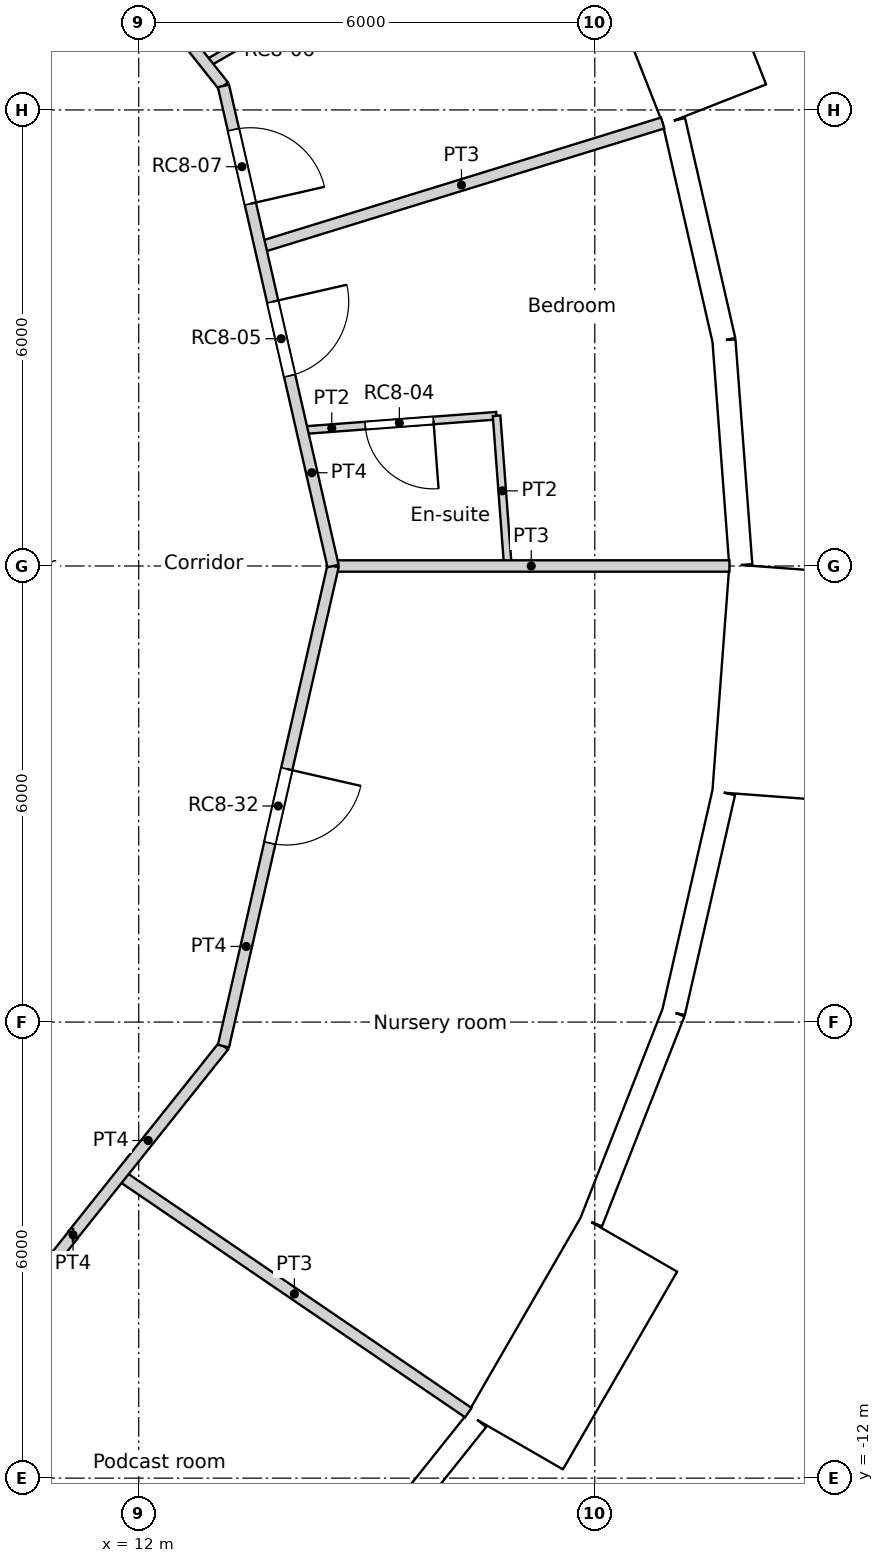
"""IFC4 building model, lengths in metres.
Left out: names, types, materials, properties, quantities, classifications, styles, units other than length and angle.
Written with IfcOpenShell. Run it as: python <this file> out.ifc"""

import sys

from ifc_helpers import new_model, si_unit, direction, frame, frame_2d, origin, origin_2d, place, context, subcontext, project, spatial, rectangle, circle, extrude, element, fill, save


model = new_model("IFC4")
c1 = context("Model", 3, precision=1e-05, world=origin(), true_north=direction((0.0, 1.0)))
c2 = subcontext(c1, "Body", "Model", "MODEL_VIEW")
j1 = project(units=[si_unit("LENGTHUNIT", "METRE"), si_unit("PLANEANGLEUNIT", "RADIAN")], contexts=[c1])
p1 = place(None, origin())
s1 = spatial("IfcSite", under=j1, at=p1, CompositionType="ELEMENT")
p2 = place(p1, origin())
s2 = spatial("IfcBuilding", under=s1, at=p2, CompositionType="ELEMENT")
p3 = place(p2, frame((0.0, 0.0, 305.4)))
s3 = spatial("IfcBuildingStorey", under=s2, at=p3, CompositionType="ELEMENT", Elevation=305.4)
for number, where, z_axis, x_axis in (
    (1, (18.822, 0.0, 0.0), (0.0, 0.0, 1.0), (1.0, 0.0, 0.0)),
    (2, (17.986, 5.548, 0.0), (0.0, 0.0, 1.0), (1.0, 0.0, 0.0)),
    (3, (15.552, -10.603, 0.0), (0.0, 0.0, 1.0), (1.0, 0.0, 0.0)),
    (4, (17.986, -5.548, 0.0), (0.0, 0.0, 1.0), (1.0, 0.0, 0.0)),
):
    element("IfcColumn", number, at=place(p3, frame(where, z_axis=z_axis, x_axis=x_axis)), inside=s3, PredefinedType="COLUMN", context=c2, shape_type="SweptSolid", body=[
        extrude(circle(Radius=0.45, at=origin_2d()), origin(), (0.0, 0.0, 1.0), 3.6),
    ])
p4 = place(p3, frame((19.921, 0.015, 0.0), z_axis=(0.0, 0.0, 1.0), x_axis=(-0.07474897196, 0.997202382263, 0.0)))
e5 = element("IfcWall", 5, at=p4, inside=s3, PredefinedType="SOLIDWALL", context=c2, shape_type="SweptSolid", body=[
    extrude(rectangle(XDim=2.962, YDim=0.3, at=frame_2d((1.481, 0.0))), origin(), (0.0, 0.0, 1.0), 2.8),
])
p5 = place(p4, frame((1.481, 0.0, 1.55)))
e6 = element("IfcOpeningElement", 6, at=p5, cuts=e5, PredefinedType="OPENING", context=c2, shape_type="SweptSolid", body=[
    extrude(circle(Radius=0.9, at=origin_2d()), frame((0.0, 0.16, 0.0), z_axis=(0.0, -1.0, 0.0), x_axis=(1.0, 0.0, 0.0)), (0.0, 0.0, 1.0), 0.32),
])
p6 = place(p3, frame((19.699, 2.969, 0.0), z_axis=(0.0, 0.0, 1.0), x_axis=(-0.222529389789, 0.974925982155, 0.0)))
e7 = element("IfcWall", 7, at=p6, inside=s3, PredefinedType="SOLIDWALL", context=c2, shape_type="SweptSolid", body=[
    extrude(rectangle(XDim=2.962, YDim=0.3, at=frame_2d((1.481, 0.0))), origin(), (0.0, 0.0, 1.0), 3.25),
])
p7 = place(p6, frame((1.481, 0.0, 1.55)))
e8 = element("IfcOpeningElement", 8, at=p7, cuts=e7, PredefinedType="OPENING", context=c2, shape_type="SweptSolid", body=[
    extrude(circle(Radius=0.9, at=origin_2d()), frame((0.0, 0.16, 0.0), z_axis=(0.0, -1.0, 0.0), x_axis=(1.0, 0.0, 0.0)), (0.0, 0.0, 1.0), 0.32),
])
p8 = place(p3, frame((19.576, 6.072, -0.35), z_axis=(0.0, 0.0, 1.0), x_axis=(-0.36537792632, 0.93085926485, 0.0)))
e9 = element("IfcWall", 9, at=p8, inside=s3, PredefinedType="ELEMENTEDWALL", context=c2, shape_type="SweptSolid", body=[
    extrude(rectangle(XDim=3.0, YDim=1.45, at=frame_2d((1.5, 0.0))), origin(), (0.0, 0.0, 1.0), 3.6),
])
p9 = place(p8, frame((1.5, 0.0, 1.9)))
e10 = element("IfcOpeningElement", 10, at=p9, cuts=e9, PredefinedType="OPENING", context=c2, shape_type="SweptSolid", body=[
    extrude(circle(Radius=0.9, at=origin_2d()), frame((0.0, 0.735, 0.0), z_axis=(0.0, -1.0, 0.0), x_axis=(1.0, 0.0, 0.0)), (0.0, 0.0, 1.0), 1.47),
])
p10 = place(p3, frame((14.604, -13.55, 0.0), z_axis=(0.0, 0.0, 1.0), x_axis=(0.623498236992, 0.781824755599, 0.0)))
e11 = element("IfcWall", 11, at=p10, inside=s3, PredefinedType="SOLIDWALL", context=c2, shape_type="SweptSolid", body=[
    extrude(rectangle(XDim=2.962, YDim=0.3, at=frame_2d((1.481, 0.0))), origin(), (0.0, 0.0, 1.0), 3.25),
])
p11 = place(p10, frame((1.481, 0.0, 1.55)))
e12 = element("IfcOpeningElement", 12, at=p11, cuts=e11, PredefinedType="OPENING", context=c2, shape_type="SweptSolid", body=[
    extrude(circle(Radius=0.9, at=origin_2d()), frame((0.0, 0.16, 0.0), z_axis=(0.0, -1.0, 0.0), x_axis=(1.0, 0.0, 0.0)), (0.0, 0.0, 1.0), 0.32),
])
p12 = place(p3, frame((16.952, -11.52, -0.35), z_axis=(0.0, 0.0, 1.0), x_axis=(0.499990139034, 0.866031096941, 0.0)))
e13 = element("IfcWall", 13, at=p12, inside=s3, PredefinedType="ELEMENTEDWALL", context=c2, shape_type="SweptSolid", body=[
    extrude(rectangle(XDim=3.0, YDim=1.45, at=frame_2d((1.5, 0.0))), origin(), (0.0, 0.0, 1.0), 3.6),
])
p13 = place(p12, frame((1.5, 0.0, 1.9)))
e14 = element("IfcOpeningElement", 14, at=p13, cuts=e13, PredefinedType="OPENING", context=c2, shape_type="SweptSolid", body=[
    extrude(circle(Radius=0.9, at=origin_2d()), frame((0.0, 0.735, 0.0), z_axis=(0.0, -1.0, 0.0), x_axis=(1.0, 0.0, 0.0)), (0.0, 0.0, 1.0), 1.47),
])
p14 = place(p3, frame((17.955, -8.629, 0.0), z_axis=(0.0, 0.0, 1.0), x_axis=(0.36530043032, 0.930889679612, 0.0)))
e15 = element("IfcWall", 15, at=p14, inside=s3, PredefinedType="SOLIDWALL", context=c2, shape_type="SweptSolid", body=[
    extrude(rectangle(XDim=2.962, YDim=0.3, at=frame_2d((1.481, 0.0))), origin(), (0.0, 0.0, 1.0), 2.8),
])
p15 = place(p14, frame((1.481, 0.0, 1.55)))
e16 = element("IfcOpeningElement", 16, at=p15, cuts=e15, PredefinedType="OPENING", context=c2, shape_type="SweptSolid", body=[
    extrude(circle(Radius=0.9, at=origin_2d()), frame((0.0, 0.16, 0.0), z_axis=(0.0, -1.0, 0.0), x_axis=(1.0, 0.0, 0.0)), (0.0, 0.0, 1.0), 0.32),
])
p16 = place(p3, frame((19.037, -5.872, 0.0), z_axis=(0.0, 0.0, 1.0), x_axis=(0.222529389789, 0.974925982155, 0.0)))
e17 = element("IfcWall", 17, at=p16, inside=s3, PredefinedType="SOLIDWALL", context=c2, shape_type="SweptSolid", body=[
    extrude(rectangle(XDim=2.962, YDim=0.3, at=frame_2d((1.481, 0.0))), origin(), (0.0, 0.0, 1.0), 3.25),
])
p17 = place(p16, frame((1.481, 0.0, 1.55)))
e18 = element("IfcOpeningElement", 18, at=p17, cuts=e17, PredefinedType="OPENING", context=c2, shape_type="SweptSolid", body=[
    extrude(circle(Radius=0.9, at=origin_2d()), frame((0.0, 0.16, 0.0), z_axis=(0.0, -1.0, 0.0), x_axis=(1.0, 0.0, 0.0)), (0.0, 0.0, 1.0), 0.32),
])
p18 = place(p3, frame((20.272, -3.023, -0.35), z_axis=(0.0, 0.0, 1.0), x_axis=(0.074785902127, 0.997199613339, 0.0)))
e19 = element("IfcWall", 19, at=p18, inside=s3, PredefinedType="ELEMENTEDWALL", context=c2, shape_type="SweptSolid", body=[
    extrude(rectangle(XDim=3.0, YDim=1.45, at=frame_2d((1.5, 0.0))), origin(), (0.0, 0.0, 1.0), 3.6),
])
p19 = place(p18, frame((1.5, 0.0, 1.9)))
e20 = element("IfcOpeningElement", 20, at=p19, cuts=e19, PredefinedType="OPENING", context=c2, shape_type="SweptSolid", body=[
    extrude(circle(Radius=0.9, at=origin_2d()), frame((0.0, 0.735, 0.0), z_axis=(0.0, -1.0, 0.0), x_axis=(1.0, 0.0, 0.0)), (0.0, 0.0, 1.0), 1.47),
])
p20 = place(p3, frame((11.137, -8.8, 0.0), z_axis=(0.0, 0.0, 1.0), x_axis=(-1.0, 0.0, 0.0)))
e21 = element("IfcWall", 21, at=p20, inside=s3, PredefinedType="PARTITIONING", context=c2, shape_type="SweptSolid", body=[
    extrude(rectangle(XDim=0.003, YDim=0.15, at=frame_2d((0.001, 0.0))), origin(), (0.0, 0.0, 1.0), 3.25),
])
p21 = place(p3, frame((10.101, -10.101, 0.0), z_axis=(0.0, 0.0, 1.0), x_axis=(0.623098344652, 0.782143498913, 0.0)))
e22 = element("IfcWall", 22, at=p21, inside=s3, PredefinedType="PARTITIONING", context=c2, shape_type="SweptSolid", body=[
    extrude(rectangle(XDim=1.661, YDim=0.15, at=frame_2d((0.831, 0.0))), origin(), (0.0, 0.0, 1.0), 3.25),
])
p22 = place(p3, frame((13.115, 6.316, 0.0), z_axis=(0.0, 0.0, 1.0), x_axis=(0.222568978642, -0.97491694505, 0.0)))
e23 = element("IfcWall", 23, at=p22, inside=s3, PredefinedType="PARTITIONING", context=c2, shape_type="SweptSolid", body=[
    extrude(rectangle(XDim=6.479, YDim=0.15, at=frame_2d((3.239, 0.0))), origin(), (0.0, 0.0, 1.0), 3.25),
])
p23 = place(p22, frame((2.911, 0.0, 0.0)))
e24 = element("IfcOpeningElement", 24, at=p23, cuts=e23, PredefinedType="OPENING", context=c2, shape_type="SweptSolid", body=[
    extrude(rectangle(XDim=1.0, YDim=2.1, at=frame_2d((0.5, 1.05))), frame((0.0, 0.075, 0.0), z_axis=(0.0, -1.0, 0.0), x_axis=(1.0, 0.0, 0.0)), (0.0, 0.0, 1.0), 0.15),
])
p24 = place(p22, frame((0.59, 0.0, 0.0)))
e25 = element("IfcOpeningElement", 25, at=p24, cuts=e23, PredefinedType="OPENING", context=c2, shape_type="SweptSolid", body=[
    extrude(rectangle(XDim=1.0, YDim=2.1, at=frame_2d((0.5, 1.05))), frame((0.0, 0.075, 0.0), z_axis=(0.0, -1.0, 0.0), x_axis=(1.0, 0.0, 0.0)), (0.0, 0.0, 1.0), 0.15),
])
p25 = place(p3, frame((11.76, 8.022, 0.0), z_axis=(0.0, 0.0, 1.0), x_axis=(0.62206805366, -0.782963177049, 0.0)))
e26 = element("IfcWall", 26, at=p25, inside=s3, PredefinedType="PARTITIONING", context=c2, shape_type="SweptSolid", body=[
    extrude(rectangle(XDim=2.179, YDim=0.15, at=frame_2d((1.089, 0.0))), origin(), (0.0, 0.0, 1.0), 3.25),
])
p26 = place(p3, frame((11.134, -8.8, 0.0), z_axis=(0.0, 0.0, 1.0), x_axis=(0.623560523309, 0.781775078761, 0.0)))
e27 = element("IfcWall", 27, at=p26, inside=s3, PredefinedType="PARTITIONING", context=c2, shape_type="SweptSolid", body=[
    extrude(rectangle(XDim=3.177, YDim=0.15, at=frame_2d((1.589, 0.0))), origin(), (0.0, 0.0, 1.0), 3.25),
])
p27 = place(p3, frame((13.115, -6.316, 0.0), z_axis=(0.0, 0.0, 1.0), x_axis=(0.222568978642, 0.97491694505, 0.0)))
e28 = element("IfcWall", 28, at=p27, inside=s3, PredefinedType="PARTITIONING", context=c2, shape_type="SweptSolid", body=[
    extrude(rectangle(XDim=6.479, YDim=0.15, at=frame_2d((3.239, 0.0))), origin(), (0.0, 0.0, 1.0), 3.25),
])
p28 = place(p27, frame((2.74, 0.0, 0.0)))
e29 = element("IfcOpeningElement", 29, at=p28, cuts=e28, PredefinedType="OPENING", context=c2, shape_type="SweptSolid", body=[
    extrude(rectangle(XDim=1.0, YDim=2.04, at=frame_2d((0.5, 1.02))), frame((0.0, 0.075, 0.0), z_axis=(0.0, -1.0, 0.0), x_axis=(1.0, 0.0, 0.0)), (0.0, 0.0, 1.0), 0.15),
])
p29 = place(p3, frame((16.708, 1.977, 0.0), z_axis=(0.0, 0.0, 1.0), x_axis=(0.074624634103, -0.997211694669, 0.0)))
e30 = element("IfcWall", 30, at=p29, inside=s3, PredefinedType="PARTITIONING", context=c2, shape_type="SweptSolid", body=[
    extrude(rectangle(XDim=1.983, YDim=0.1, at=frame_2d((0.991, 0.0))), origin(), (0.0, 0.0, 1.0), 3.25),
])
p30 = place(p3, frame((14.149, 1.785, 0.0), z_axis=(0.0, 0.0, 1.0), x_axis=(0.997193275785, 0.074870359477, 0.0)))
e31 = element("IfcWall", 31, at=p30, inside=s3, PredefinedType="PARTITIONING", context=c2, shape_type="SweptSolid", body=[
    extrude(rectangle(XDim=2.566, YDim=0.1, at=frame_2d((1.283, 0.0))), origin(), (0.0, 0.0, 1.0), 3.25),
])
p31 = place(p30, frame((0.833, 0.0, 0.0)))
e32 = element("IfcOpeningElement", 32, at=p31, cuts=e31, PredefinedType="OPENING", context=c2, shape_type="SweptSolid", body=[
    extrude(rectangle(XDim=0.9, YDim=2.04, at=frame_2d((0.45, 1.02))), frame((0.0, 0.05, 0.0), z_axis=(0.0, -1.0, 0.0), x_axis=(1.0, 0.0, 0.0)), (0.0, 0.0, 1.0), 0.1),
])
p32 = place(p3, frame((13.599, 4.195, 0.0), z_axis=(0.0, 0.0, 1.0), x_axis=(0.955580602693, 0.294729896274, 0.0)))
e33 = element("IfcWall", 33, at=p32, inside=s3, PredefinedType="PARTITIONING", context=c2, shape_type="SweptSolid", body=[
    extrude(rectangle(XDim=5.54, YDim=0.15, at=frame_2d((2.77, 0.0))), origin(), (0.0, 0.0, 1.0), 3.25),
])
p33 = place(p3, frame((14.557, 0.0, 0.0), z_axis=(0.0, 0.0, 1.0), x_axis=(1.0, 0.0, 0.0)))
e34 = element("IfcWall", 34, at=p33, inside=s3, PredefinedType="PARTITIONING", context=c2, shape_type="SweptSolid", body=[
    extrude(rectangle(XDim=5.214, YDim=0.15, at=frame_2d((2.607, 0.0))), origin(), (0.0, 0.0, 1.0), 3.25),
])
p34 = place(p3, frame((12.885, 6.605, 0.0), z_axis=(0.0, 0.0, 1.0), x_axis=(0.866076416361, 0.499911633214, 0.0)))
e35 = element("IfcWall", 35, at=p34, inside=s3, PredefinedType="PARTITIONING", context=c2, shape_type="SweptSolid", body=[
    extrude(rectangle(XDim=2.234, YDim=0.1, at=frame_2d((1.117, 0.0))), origin(), (0.0, 0.0, 1.0), 3.25),
])
p35 = place(p34, frame((0.667, 0.0, 0.0)))
e36 = element("IfcOpeningElement", 36, at=p35, cuts=e35, PredefinedType="OPENING", context=c2, shape_type="SweptSolid", body=[
    extrude(rectangle(XDim=0.9, YDim=2.04, at=frame_2d((0.45, 1.02))), frame((0.0, 0.05, 0.0), z_axis=(0.0, -1.0, 0.0), x_axis=(1.0, 0.0, 0.0)), (0.0, 0.0, 1.0), 0.1),
])
p36 = place(p3, frame((11.759, -8.017, 0.0), z_axis=(0.0, 0.0, 1.0), x_axis=(0.826207761897, -0.563365542238, 0.0)))
e37 = element("IfcWall", 37, at=p36, inside=s3, PredefinedType="PARTITIONING", context=c2, shape_type="SweptSolid", body=[
    extrude(rectangle(XDim=5.54, YDim=0.15, at=frame_2d((2.77, 0.0))), origin(), (0.0, 0.0, 1.0), 3.25),
])
p37 = place(p5, origin())
e38 = element("IfcWindow", 38, at=p37, inside=s3, PartitioningType="SINGLE_PANEL", PredefinedType="WINDOW", context=c2, shape_type="SweptSolid", body=[
    extrude(circle(Radius=0.9, at=origin_2d()), frame((0.0, 0.12, 0.0), z_axis=(0.0, -1.0, 0.0), x_axis=(1.0, 0.0, 0.0)), (0.0, 0.0, 1.0), 0.1),
])
fill(e6, e38)
p38 = place(p7, origin())
e39 = element("IfcWindow", 39, at=p38, inside=s3, PartitioningType="SINGLE_PANEL", PredefinedType="WINDOW", context=c2, shape_type="SweptSolid", body=[
    extrude(circle(Radius=0.9, at=origin_2d()), frame((0.0, 0.12, 0.0), z_axis=(0.0, -1.0, 0.0), x_axis=(1.0, 0.0, 0.0)), (0.0, 0.0, 1.0), 0.1),
])
fill(e8, e39)
p39 = place(p9, origin())
e40 = element("IfcWindow", 40, at=p39, inside=s3, PartitioningType="SINGLE_PANEL", PredefinedType="WINDOW", context=c2, shape_type="SweptSolid", body=[
    extrude(circle(Radius=0.9, at=origin_2d()), frame((0.0, 0.695, 0.0), z_axis=(0.0, -1.0, 0.0), x_axis=(1.0, 0.0, 0.0)), (0.0, 0.0, 1.0), 0.1),
])
fill(e10, e40)
p40 = place(p11, origin())
e41 = element("IfcWindow", 41, at=p40, inside=s3, PartitioningType="SINGLE_PANEL", PredefinedType="WINDOW", context=c2, shape_type="SweptSolid", body=[
    extrude(circle(Radius=0.9, at=origin_2d()), frame((0.0, 0.12, 0.0), z_axis=(0.0, -1.0, 0.0), x_axis=(1.0, 0.0, 0.0)), (0.0, 0.0, 1.0), 0.1),
])
fill(e12, e41)
p41 = place(p13, origin())
e42 = element("IfcWindow", 42, at=p41, inside=s3, PartitioningType="SINGLE_PANEL", PredefinedType="WINDOW", context=c2, shape_type="SweptSolid", body=[
    extrude(circle(Radius=0.9, at=origin_2d()), frame((0.0, 0.695, 0.0), z_axis=(0.0, -1.0, 0.0), x_axis=(1.0, 0.0, 0.0)), (0.0, 0.0, 1.0), 0.1),
])
fill(e14, e42)
p42 = place(p15, origin())
e43 = element("IfcWindow", 43, at=p42, inside=s3, PartitioningType="SINGLE_PANEL", PredefinedType="WINDOW", context=c2, shape_type="SweptSolid", body=[
    extrude(circle(Radius=0.9, at=origin_2d()), frame((0.0, 0.12, 0.0), z_axis=(0.0, -1.0, 0.0), x_axis=(1.0, 0.0, 0.0)), (0.0, 0.0, 1.0), 0.1),
])
fill(e16, e43)
p43 = place(p17, origin())
e44 = element("IfcWindow", 44, at=p43, inside=s3, PartitioningType="SINGLE_PANEL", PredefinedType="WINDOW", context=c2, shape_type="SweptSolid", body=[
    extrude(circle(Radius=0.9, at=origin_2d()), frame((0.0, 0.12, 0.0), z_axis=(0.0, -1.0, 0.0), x_axis=(1.0, 0.0, 0.0)), (0.0, 0.0, 1.0), 0.1),
])
fill(e18, e44)
p44 = place(p19, origin())
e45 = element("IfcWindow", 45, at=p44, inside=s3, PartitioningType="SINGLE_PANEL", PredefinedType="WINDOW", context=c2, shape_type="SweptSolid", body=[
    extrude(circle(Radius=0.9, at=origin_2d()), frame((0.0, 0.695, 0.0), z_axis=(0.0, -1.0, 0.0), x_axis=(1.0, 0.0, 0.0)), (0.0, 0.0, 1.0), 0.1),
])
fill(e20, e45)
p45 = place(p31, origin())
e46 = element("IfcDoor", 46, at=p45, inside=s3, OperationType="SINGLE_SWING_LEFT", PredefinedType="DOOR", context=c2, shape_type="SweptSolid", body=[
    extrude(rectangle(XDim=0.9, YDim=2.04, at=frame_2d((0.45, 1.02))), frame((0.0, 0.025, 0.0), z_axis=(0.0, -1.0, 0.0), x_axis=(1.0, 0.0, 0.0)), (0.0, 0.0, 1.0), 0.05),
])
fill(e32, e46)
p46 = place(p23, origin())
e47 = element("IfcDoor", 47, at=p46, inside=s3, OperationType="SINGLE_SWING_LEFT", PredefinedType="DOOR", context=c2, shape_type="SweptSolid", body=[
    extrude(rectangle(XDim=1.0, YDim=2.1, at=frame_2d((0.5, 1.05))), frame((0.0, 0.025, 0.0), z_axis=(0.0, -1.0, 0.0), x_axis=(1.0, 0.0, 0.0)), (0.0, 0.0, 1.0), 0.05),
])
fill(e24, e47)
p47 = place(p24, origin())
e48 = element("IfcDoor", 48, at=p47, inside=s3, OperationType="SINGLE_SWING_RIGHT", PredefinedType="DOOR", context=c2, shape_type="SweptSolid", body=[
    extrude(rectangle(XDim=1.0, YDim=2.1, at=frame_2d((0.5, 1.05))), frame((0.0, 0.025, 0.0), z_axis=(0.0, -1.0, 0.0), x_axis=(1.0, 0.0, 0.0)), (0.0, 0.0, 1.0), 0.05),
])
fill(e25, e48)
p48 = place(p28, origin())
e49 = element("IfcDoor", 49, at=p48, inside=s3, OperationType="SINGLE_SWING_LEFT", PredefinedType="DOOR", context=c2, shape_type="SweptSolid", body=[
    extrude(rectangle(XDim=1.0, YDim=2.04, at=frame_2d((0.5, 1.02))), frame((0.0, 0.025, 0.0), z_axis=(0.0, -1.0, 0.0), x_axis=(1.0, 0.0, 0.0)), (0.0, 0.0, 1.0), 0.05),
])
fill(e29, e49)
save(model, sys.argv[1])
